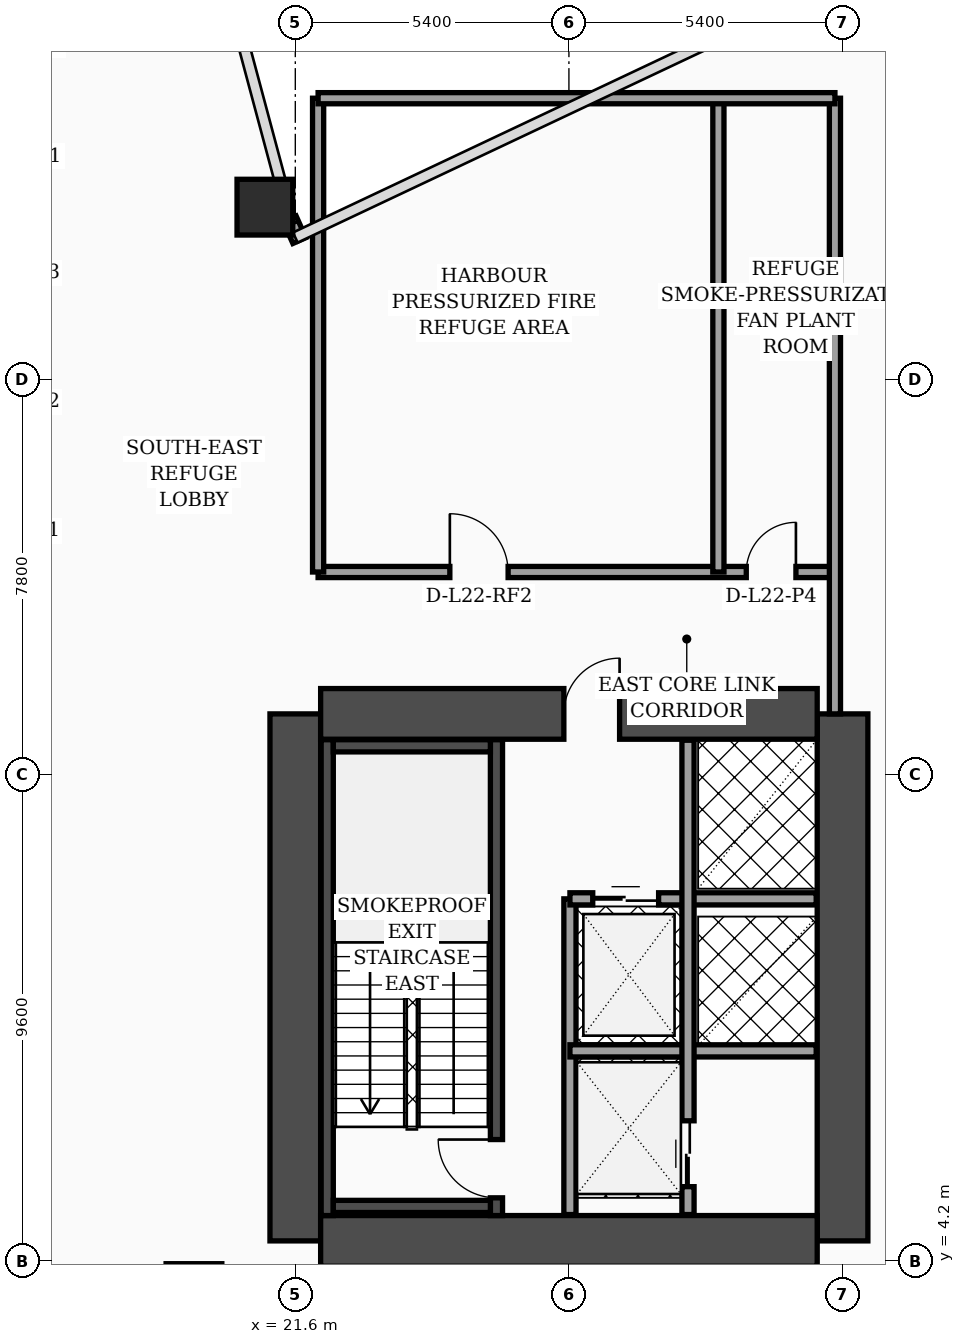
"""IFC4 building model, lengths in metres.
Left out: names, types, materials, properties, quantities, classifications, styles, units other than length and angle.
Written with IfcOpenShell. Run it as: python <this file> out.ifc"""

import sys

from ifc_helpers import new_model, si_unit, direction, frame, frame_2d, origin, origin_2d, place, context, subcontext, project, spatial, rectangle, hollow_rectangle, extrude, element, fill, save


model = new_model("IFC4")
c1 = context("Model", 3, precision=1e-05, world=origin(), true_north=direction((0.0, 1.0)))
c2 = subcontext(c1, "Body", "Model", "MODEL_VIEW")
j1 = project(units=[si_unit("LENGTHUNIT", "METRE"), si_unit("PLANEANGLEUNIT", "RADIAN")], contexts=[c1])
p1 = place(None, origin())
s1 = spatial("IfcSite", under=j1, at=p1, CompositionType="ELEMENT")
p2 = place(p1, origin())
s2 = spatial("IfcBuilding", under=s1, at=p2, CompositionType="ELEMENT")
p3 = place(p2, frame((0.0, 0.0, 92.6)))
s3 = spatial("IfcBuildingStorey", under=s2, at=p3, CompositionType="ELEMENT", Elevation=92.6)
for number, where, z_axis, x_axis in (
    (1, (21.6, 4.6, 0.0), (0.0, 0.0, 1.0), (0.0, 1.0, 0.0)),
    (2, (32.4, 4.6, 0.0), (0.0, 0.0, 1.0), (0.0, 1.0, 0.0)),
):
    element("IfcWall", number, at=place(p3, frame(where, z_axis=z_axis, x_axis=x_axis)), inside=s3, PredefinedType="SHEAR", context=c2, shape_type="SweptSolid", body=[
        extrude(rectangle(XDim=10.4, YDim=1.0, at=frame_2d((5.2, 0.0))), origin(), (0.0, 0.0, 1.0), 4.35),
    ])
p4 = place(p3, frame((22.1, 15.0, 0.0), z_axis=(0.0, 0.0, 1.0), x_axis=(1.0, 0.0, 0.0)))
e3 = element("IfcWall", 3, at=p4, inside=s3, PredefinedType="SHEAR", context=c2, shape_type="SweptSolid", body=[
    extrude(rectangle(XDim=9.8, YDim=1.0, at=frame_2d((4.9, 0.0))), origin(), (0.0, 0.0, 1.0), 4.35),
])
p5 = place(p4, frame((4.8, 0.0, 0.0)))
e4 = element("IfcOpeningElement", 4, at=p5, cuts=e3, PredefinedType="OPENING", context=c2, shape_type="SweptSolid", body=[
    extrude(rectangle(XDim=1.1, YDim=2.2, at=frame_2d((0.55, 1.1))), frame((0.0, 0.51, 0.0), z_axis=(0.0, -1.0, 0.0), x_axis=(1.0, 0.0, 0.0)), (0.0, 0.0, 1.0), 1.02),
])
p6 = place(p3, frame((22.1, 4.6, 0.0), z_axis=(0.0, 0.0, 1.0), x_axis=(1.0, 0.0, 0.0)))
e5 = element("IfcWall", 5, at=p6, inside=s3, PredefinedType="SHEAR", context=c2, shape_type="SweptSolid", body=[
    extrude(rectangle(XDim=9.8, YDim=1.0, at=frame_2d((4.9, 0.0))), origin(), (0.0, 0.0, 1.0), 4.35),
])
p7 = place(p3, frame((22.23, 5.1, 0.0), z_axis=(0.0, 0.0, 1.0), x_axis=(0.0, 1.0, 0.0)))
e6 = element("IfcWall", 6, at=p7, inside=s3, PredefinedType="SOLIDWALL", context=c2, shape_type="SweptSolid", body=[
    extrude(rectangle(XDim=9.39, YDim=0.24, at=frame_2d((4.695, 0.0))), origin(), (0.0, 0.0, 1.0), 4.35),
])
p8 = place(p3, frame((25.57, 5.1, 0.0), z_axis=(0.0, 0.0, 1.0), x_axis=(0.0, 1.0, 0.0)))
e7 = element("IfcWall", 7, at=p8, inside=s3, PredefinedType="SOLIDWALL", context=c2, shape_type="SweptSolid", body=[
    extrude(rectangle(XDim=9.39, YDim=0.24, at=frame_2d((4.695, 0.0))), origin(), (0.0, 0.0, 1.0), 4.35),
])
p9 = place(p8, frame((0.35, 0.0, 0.0)))
e8 = element("IfcOpeningElement", 8, at=p9, cuts=e7, PredefinedType="OPENING", context=c2, shape_type="SweptSolid", body=[
    extrude(rectangle(XDim=1.15, YDim=2.2, at=frame_2d((0.575, 1.1))), frame((0.0, 0.13, 0.0), z_axis=(0.0, -1.0, 0.0), x_axis=(1.0, 0.0, 0.0)), (0.0, 0.0, 1.0), 0.26),
])
for number, where, z_axis, x_axis in (
    (9, (22.35, 5.28, 0.0), (0.0, 0.0, 1.0), (1.0, 0.0, 0.0)),
    (10, (22.35, 14.37, 0.0), (0.0, 0.0, 1.0), (1.0, 0.0, 0.0)),
):
    element("IfcWall", number, at=place(p3, frame(where, z_axis=z_axis, x_axis=x_axis)), inside=s3, PredefinedType="SOLIDWALL", context=c2, shape_type="SweptSolid", body=[
        extrude(rectangle(XDim=3.1, YDim=0.24, at=frame_2d((1.55, 0.0))), origin(), (0.0, 0.0, 1.0), 4.35),
    ])
for number, where, z_axis, x_axis in (
    (11, (21.0, 25.0, 0.0), (0.0, 0.0, 1.0), (1.0, 0.0, 0.0)),
    (12, (19.6, 3.6, 0.0), (0.0, 0.0, 1.0), (1.0, 0.0, 0.0)),
):
    element("IfcColumn", number, at=place(p3, frame(where, z_axis=z_axis, x_axis=x_axis)), inside=s3, PredefinedType="COLUMN", context=c2, shape_type="SweptSolid", body=[
        extrude(hollow_rectangle(XDim=1.1, YDim=1.1, WallThickness=0.045, at=origin_2d()), origin(), (0.0, 0.0, 1.0), 4.35),
    ])
p10 = place(p3, frame((21.68, 24.34, 0.0), z_axis=(0.0, 0.0, 1.0), x_axis=(-0.40758134973, 0.913168901875, 0.0)))
e13 = element("IfcWall", 13, at=p10, inside=s3, PredefinedType="SOLIDWALL", context=c2, shape_type="SweptSolid", body=[
    extrude(rectangle(XDim=0.471, YDim=0.28, at=frame_2d((0.235, 0.0))), origin(), (0.0, 0.0, 1.0), 4.35),
])
p11 = place(p3, frame((27.02, 5.12, 0.0), z_axis=(0.0, 0.0, 1.0), x_axis=(0.0, 1.0, 0.0)))
e14 = element("IfcWall", 14, at=p11, inside=s3, PredefinedType="SOLIDWALL", context=c2, shape_type="SweptSolid", body=[
    extrude(rectangle(XDim=6.23, YDim=0.24, at=frame_2d((3.115, 0.0))), origin(), (0.0, 0.0, 1.0), 4.35),
])
p12 = place(p3, frame((27.02, 11.35, 0.0), z_axis=(0.0, 0.0, 1.0), x_axis=(1.0, 0.0, 0.0)))
e15 = element("IfcWall", 15, at=p12, inside=s3, PredefinedType="SOLIDWALL", context=c2, shape_type="SweptSolid", body=[
    extrude(rectangle(XDim=4.86, YDim=0.24, at=frame_2d((2.43, 0.0))), origin(), (0.0, 0.0, 1.0), 4.35),
])
p13 = place(p12, frame((0.45, 0.0, 0.0)))
e16 = element("IfcOpeningElement", 16, at=p13, cuts=e15, PredefinedType="OPENING", context=c2, shape_type="SweptSolid", body=[
    extrude(rectangle(XDim=1.3, YDim=2.35, at=frame_2d((0.65, 1.175))), frame((0.0, 0.13, 0.0), z_axis=(0.0, -1.0, 0.0), x_axis=(1.0, 0.0, 0.0)), (0.0, 0.0, 1.0), 0.26),
])
p14 = place(p3, frame((27.02, 8.35, 0.0), z_axis=(0.0, 0.0, 1.0), x_axis=(1.0, 0.0, 0.0)))
e17 = element("IfcWall", 17, at=p14, inside=s3, PredefinedType="SOLIDWALL", context=c2, shape_type="SweptSolid", body=[
    extrude(rectangle(XDim=4.86, YDim=0.24, at=frame_2d((2.43, 0.0))), origin(), (0.0, 0.0, 1.0), 4.35),
])
p15 = place(p3, frame((29.35, 5.12, 0.0), z_axis=(0.0, 0.0, 1.0), x_axis=(0.0, 1.0, 0.0)))
e18 = element("IfcWall", 18, at=p15, inside=s3, PredefinedType="SOLIDWALL", context=c2, shape_type="SweptSolid", body=[
    extrude(rectangle(XDim=9.36, YDim=0.24, at=frame_2d((4.68, 0.0))), origin(), (0.0, 0.0, 1.0), 4.35),
])
p16 = place(p15, frame((0.55, 0.0, 0.0)))
e19 = element("IfcOpeningElement", 19, at=p16, cuts=e18, PredefinedType="OPENING", context=c2, shape_type="SweptSolid", body=[
    extrude(rectangle(XDim=1.3, YDim=2.35, at=frame_2d((0.65, 1.175))), frame((0.0, 0.13, 0.0), z_axis=(0.0, -1.0, 0.0), x_axis=(1.0, 0.0, 0.0)), (0.0, 0.0, 1.0), 0.26),
])
p17 = place(p3, frame((22.05, 17.8, 0.0), z_axis=(0.0, 0.0, 1.0), x_axis=(1.0, 0.0, 0.0)))
e20 = element("IfcWall", 20, at=p17, inside=s3, PredefinedType="SOLIDWALL", context=c2, shape_type="SweptSolid", body=[
    extrude(rectangle(XDim=10.2, YDim=0.22, at=frame_2d((5.1, 0.0))), origin(), (0.0, 0.0, 1.0), 2.65),
])
p18 = place(p17, frame((2.6, 0.0, 0.0)))
e21 = element("IfcOpeningElement", 21, at=p18, cuts=e20, PredefinedType="OPENING", context=c2, shape_type="SweptSolid", body=[
    extrude(rectangle(XDim=1.15, YDim=2.2, at=frame_2d((0.575, 1.1))), frame((0.0, 0.12, 0.0), z_axis=(0.0, -1.0, 0.0), x_axis=(1.0, 0.0, 0.0)), (0.0, 0.0, 1.0), 0.24),
])
p19 = place(p17, frame((8.45, 0.0, 0.0)))
e22 = element("IfcOpeningElement", 22, at=p19, cuts=e20, PredefinedType="OPENING", context=c2, shape_type="SweptSolid", body=[
    extrude(rectangle(XDim=0.98, YDim=2.15, at=frame_2d((0.49, 1.075))), frame((0.0, 0.12, 0.0), z_axis=(0.0, -1.0, 0.0), x_axis=(1.0, 0.0, 0.0)), (0.0, 0.0, 1.0), 0.24),
])
for number, where, z_axis, x_axis in (
    (23, (29.95, 17.8, 0.0), (0.0, 0.0, 1.0), (0.0, 1.0, 0.0)),
    (24, (22.05, 17.8, 0.0), (0.0, 0.0, 1.0), (0.0, 1.0, 0.0)),
):
    element("IfcWall", number, at=place(p3, frame(where, z_axis=z_axis, x_axis=x_axis)), inside=s3, PredefinedType="SOLIDWALL", context=c2, shape_type="SweptSolid", body=[
        extrude(rectangle(XDim=9.35, YDim=0.22, at=frame_2d((4.675, 0.0))), origin(), (0.0, 0.0, 1.0), 2.65),
    ])
p20 = place(p3, frame((32.25, 15.0, 0.0), z_axis=(0.0, 0.0, 1.0), x_axis=(0.0, 1.0, 0.0)))
e25 = element("IfcWall", 25, at=p20, inside=s3, PredefinedType="SOLIDWALL", context=c2, shape_type="SweptSolid", body=[
    extrude(rectangle(XDim=12.15, YDim=0.22, at=frame_2d((6.075, 0.0))), origin(), (0.0, 0.0, 1.0), 2.65),
])
p21 = place(p3, frame((22.05, 27.15, 0.0), z_axis=(0.0, 0.0, 1.0), x_axis=(1.0, 0.0, 0.0)))
e26 = element("IfcWall", 26, at=p21, inside=s3, PredefinedType="SOLIDWALL", context=c2, shape_type="SweptSolid", body=[
    extrude(rectangle(XDim=10.2, YDim=0.22, at=frame_2d((5.1, 0.0))), origin(), (0.0, 0.0, 1.0), 2.65),
])
p22 = place(p13, origin())
e27 = element("IfcDoor", 27, at=p22, inside=s3, OperationType="DOUBLE_DOOR_SLIDING", PredefinedType="DOOR", context=c2, shape_type="SweptSolid", body=[
    extrude(rectangle(XDim=1.3, YDim=2.35, at=frame_2d((0.65, 1.175))), frame((0.0, 0.025, 0.0), z_axis=(0.0, -1.0, 0.0), x_axis=(1.0, 0.0, 0.0)), (0.0, 0.0, 1.0), 0.05),
])
fill(e16, e27)
p23 = place(p16, origin())
e28 = element("IfcDoor", 28, at=p23, inside=s3, OperationType="DOUBLE_DOOR_SLIDING", PredefinedType="DOOR", context=c2, shape_type="SweptSolid", body=[
    extrude(rectangle(XDim=1.3, YDim=2.35, at=frame_2d((0.65, 1.175))), frame((0.0, 0.025, 0.0), z_axis=(0.0, -1.0, 0.0), x_axis=(1.0, 0.0, 0.0)), (0.0, 0.0, 1.0), 0.05),
])
fill(e19, e28)
p24 = place(p18, origin())
e29 = element("IfcDoor", 29, at=p24, inside=s3, OperationType="SINGLE_SWING_LEFT", PredefinedType="DOOR", context=c2, shape_type="SweptSolid", body=[
    extrude(rectangle(XDim=1.15, YDim=2.2, at=frame_2d((0.575, 1.1))), frame((0.0, 0.025, 0.0), z_axis=(0.0, -1.0, 0.0), x_axis=(1.0, 0.0, 0.0)), (0.0, 0.0, 1.0), 0.05),
])
fill(e21, e29)
p25 = place(p19, origin())
e30 = element("IfcDoor", 30, at=p25, inside=s3, OperationType="SINGLE_SWING_RIGHT", PredefinedType="DOOR", context=c2, shape_type="SweptSolid", body=[
    extrude(rectangle(XDim=0.98, YDim=2.15, at=frame_2d((0.49, 1.075))), frame((0.0, 0.025, 0.0), z_axis=(0.0, -1.0, 0.0), x_axis=(1.0, 0.0, 0.0)), (0.0, 0.0, 1.0), 0.05),
])
fill(e22, e30)
p26 = place(p9, origin())
e31 = element("IfcDoor", 31, at=p26, inside=s3, OperationType="SINGLE_SWING_RIGHT", PredefinedType="DOOR", context=c2, shape_type="SweptSolid", body=[
    extrude(rectangle(XDim=1.15, YDim=2.2, at=frame_2d((0.575, 1.1))), frame((0.0, 0.025, 0.0), z_axis=(0.0, -1.0, 0.0), x_axis=(1.0, 0.0, 0.0)), (0.0, 0.0, 1.0), 0.05),
])
fill(e8, e31)
p27 = place(p5, origin())
e32 = element("IfcDoor", 32, at=p27, inside=s3, OperationType="SINGLE_SWING_RIGHT", PredefinedType="DOOR", context=c2, shape_type="SweptSolid", body=[
    extrude(rectangle(XDim=1.1, YDim=2.2, at=frame_2d((0.55, 1.1))), frame((0.0, 0.025, 0.0), z_axis=(0.0, -1.0, 0.0), x_axis=(1.0, 0.0, 0.0)), (0.0, 0.0, 1.0), 0.05),
])
fill(e4, e32)
save(model, sys.argv[1])
